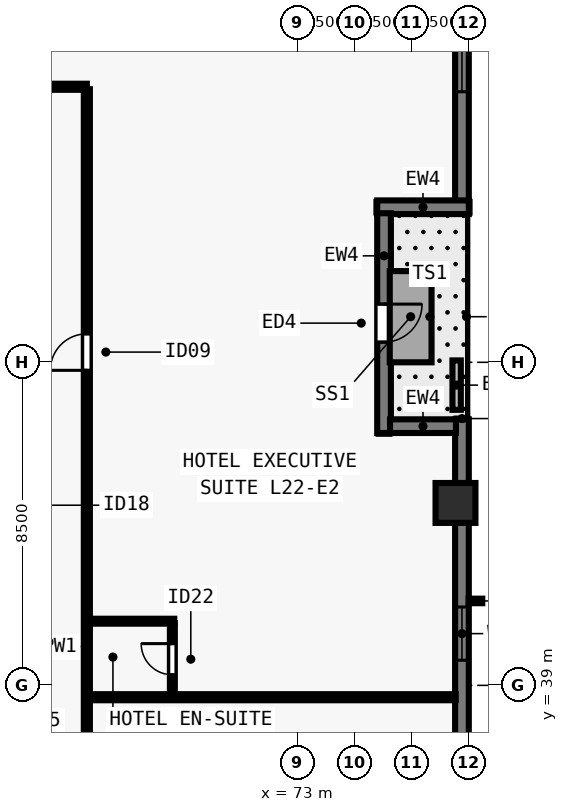
"""IFC4 building model, lengths in metres.
Left out: names, types, materials, properties, quantities, classifications, styles, units other than length and angle.
Written with IfcOpenShell. Run it as: python <this file> out.ifc"""

import sys

from ifc_helpers import new_model, si_unit, direction, frame, frame_2d, origin, origin_2d, place, context, subcontext, project, spatial, rectangle, extrude, element, fill, save


model = new_model("IFC4")
c1 = context("Model", 3, precision=1e-05, world=origin(), true_north=direction((0.0, 1.0)))
c2 = subcontext(c1, "Body", "Model", "MODEL_VIEW")
j1 = project(units=[si_unit("LENGTHUNIT", "METRE"), si_unit("PLANEANGLEUNIT", "RADIAN")], contexts=[c1])
p1 = place(None, origin())
s1 = spatial("IfcSite", under=j1, at=p1, CompositionType="ELEMENT")
p2 = place(p1, origin())
s2 = spatial("IfcBuilding", under=s1, at=p2, CompositionType="ELEMENT")
p3 = place(p2, frame((0.0, 0.0, 83.0)))
s3 = spatial("IfcBuildingStorey", under=s2, at=p3, CompositionType="ELEMENT", Elevation=83.0)
p4 = place(p3, frame((77.15, 43.8, 0.0), z_axis=(0.0, 0.0, 1.0), x_axis=(0.0, 1.0, 0.0)))
e1 = element("IfcColumn", 1, at=p4, inside=s3, PredefinedType="COLUMN", context=c2, shape_type="SweptSolid", body=[
    extrude(rectangle(XDim=1.05, YDim=1.05, at=origin_2d()), origin(), (0.0, 0.0, 1.0), 3.5),
])
p5 = place(p3, frame((77.32, 46.0, 0.0), z_axis=(0.0, 0.0, 1.0), x_axis=(0.0, -1.0, 0.0)))
e2 = element("IfcWall", 2, at=p5, inside=s3, PredefinedType="SOLIDWALL", context=c2, shape_type="SweptSolid", body=[
    extrude(rectangle(XDim=29.162, YDim=0.36, at=frame_2d((14.581, 0.0))), origin(), (0.0, 0.0, 1.0), 3.28),
])
p6 = place(p5, frame((4.938, 0.0, 0.8)))
e3 = element("IfcOpeningElement", 3, at=p6, cuts=e2, PredefinedType="OPENING", context=c2, shape_type="SweptSolid", body=[
    extrude(rectangle(XDim=1.4, YDim=1.544, at=frame_2d((0.7, 0.772))), frame((0.0, 0.19, 0.0), z_axis=(0.0, -1.0, 0.0), x_axis=(1.0, 0.0, 0.0)), (0.0, 0.0, 1.0), 0.38),
])
p7 = place(p5, frame((8.341, 0.0, 0.8)))
e4 = element("IfcOpeningElement", 4, at=p7, cuts=e2, PredefinedType="OPENING", context=c2, shape_type="SweptSolid", body=[
    extrude(rectangle(XDim=1.75, YDim=1.544, at=frame_2d((0.875, 0.772))), frame((0.0, 0.19, 0.0), z_axis=(0.0, -1.0, 0.0), x_axis=(1.0, 0.0, 0.0)), (0.0, 0.0, 1.0), 0.38),
])
p8 = place(p5, frame((12.942, 0.0, 0.8)))
e5 = element("IfcOpeningElement", 5, at=p8, cuts=e2, PredefinedType="OPENING", context=c2, shape_type="SweptSolid", body=[
    extrude(rectangle(XDim=1.4, YDim=1.544, at=frame_2d((0.7, 0.772))), frame((0.0, 0.19, 0.0), z_axis=(0.0, -1.0, 0.0), x_axis=(1.0, 0.0, 0.0)), (0.0, 0.0, 1.0), 0.38),
])
p9 = place(p5, frame((15.494, 0.0, 0.8)))
e6 = element("IfcOpeningElement", 6, at=p9, cuts=e2, PredefinedType="OPENING", context=c2, shape_type="SweptSolid", body=[
    extrude(rectangle(XDim=1.75, YDim=1.544, at=frame_2d((0.875, 0.772))), frame((0.0, 0.19, 0.0), z_axis=(0.0, -1.0, 0.0), x_axis=(1.0, 0.0, 0.0)), (0.0, 0.0, 1.0), 0.38),
])
p10 = place(p5, frame((19.247, 0.0, 0.8)))
e7 = element("IfcOpeningElement", 7, at=p10, cuts=e2, PredefinedType="OPENING", context=c2, shape_type="SweptSolid", body=[
    extrude(rectangle(XDim=1.4, YDim=1.544, at=frame_2d((0.7, 0.772))), frame((0.0, 0.19, 0.0), z_axis=(0.0, -1.0, 0.0), x_axis=(1.0, 0.0, 0.0)), (0.0, 0.0, 1.0), 0.38),
])
p11 = place(p3, frame((77.32, 61.5, 0.0), z_axis=(0.0, 0.0, 1.0), x_axis=(0.0, -1.0, 0.0)))
e8 = element("IfcWall", 8, at=p11, inside=s3, PredefinedType="SOLIDWALL", context=c2, shape_type="SweptSolid", body=[
    extrude(rectangle(XDim=9.762, YDim=0.36, at=frame_2d((4.881, 0.0))), origin(), (0.0, 0.0, 1.0), 3.28),
])
p12 = place(p11, frame((5.481, 0.0, 0.8)))
e9 = element("IfcOpeningElement", 9, at=p12, cuts=e8, PredefinedType="OPENING", context=c2, shape_type="SweptSolid", body=[
    extrude(rectangle(XDim=1.4, YDim=1.544, at=frame_2d((0.7, 0.772))), frame((0.0, 0.19, 0.0), z_axis=(0.0, -1.0, 0.0), x_axis=(1.0, 0.0, 0.0)), (0.0, 0.0, 1.0), 0.38),
])
p13 = place(p3, frame((77.5, 51.58, 0.0), z_axis=(0.0, 0.0, 1.0), x_axis=(-1.0, 0.0, 0.0)))
e10 = element("IfcWall", 10, at=p13, inside=s3, PredefinedType="SOLIDWALL", context=c2, shape_type="SweptSolid", body=[
    extrude(rectangle(XDim=2.41, YDim=0.36, at=frame_2d((1.205, 0.0))), origin(), (0.0, 0.0, 1.0), 3.28),
])
p14 = place(p3, frame((75.27, 51.422, 0.0), z_axis=(0.0, 0.0, 1.0), x_axis=(0.0, -1.0, 0.0)))
e11 = element("IfcWall", 11, at=p14, inside=s3, PredefinedType="SOLIDWALL", context=c2, shape_type="SweptSolid", body=[
    extrude(rectangle(XDim=5.782, YDim=0.36, at=frame_2d((2.891, 0.0))), origin(), (0.0, 0.0, 1.0), 3.28),
])
p15 = place(p14, frame((2.391, 0.0, 0.0)))
e12 = element("IfcOpeningElement", 12, at=p15, cuts=e11, PredefinedType="OPENING", context=c2, shape_type="SweptSolid", body=[
    extrude(rectangle(XDim=1.0, YDim=2.15, at=frame_2d((0.5, 1.075))), frame((0.0, 0.19, 0.0), z_axis=(0.0, -1.0, 0.0), x_axis=(1.0, 0.0, 0.0)), (0.0, 0.0, 1.0), 0.38),
])
p16 = place(p3, frame((75.428, 45.82, 0.0), z_axis=(0.0, 0.0, 1.0), x_axis=(1.0, 0.0, 0.0)))
e13 = element("IfcWall", 13, at=p16, inside=s3, PredefinedType="SOLIDWALL", context=c2, shape_type="SweptSolid", body=[
    extrude(rectangle(XDim=1.734, YDim=0.36, at=frame_2d((0.867, 0.0))), origin(), (0.0, 0.0, 1.0), 3.28),
])
p17 = place(p3, frame((77.18, 46.25, 0.0), z_axis=(0.0, 0.0, 1.0), x_axis=(0.0, 1.0, 0.0)))
e14 = element("IfcWall", 14, at=p17, inside=s3, PredefinedType="PARAPET", context=c2, shape_type="SweptSolid", body=[
    extrude(rectangle(XDim=1.3, YDim=0.22, at=frame_2d((0.65, 0.0))), origin(), (0.0, 0.0, 1.0), 0.55),
])
p18 = place(p3, frame((36.55, 54.75, 0.0), z_axis=(0.0, 0.0, 1.0), x_axis=(1.0, 0.0, 0.0)))
e15 = element("IfcWall", 15, at=p18, inside=s3, PredefinedType="PARTITIONING", context=c2, shape_type="SweptSolid", body=[
    extrude(rectangle(XDim=30.9, YDim=0.16, at=frame_2d((15.45, 0.0))), origin(), (0.0, 0.0, 1.0), 3.28),
])
p19 = place(p18, frame((2.83, 0.0, 0.0)))
e16 = element("IfcOpeningElement", 16, at=p19, cuts=e15, PredefinedType="OPENING", context=c2, shape_type="SweptSolid", body=[
    extrude(rectangle(XDim=0.96, YDim=2.15, at=frame_2d((0.48, 1.075))), frame((0.0, 0.09, 0.0), z_axis=(0.0, -1.0, 0.0), x_axis=(1.0, 0.0, 0.0)), (0.0, 0.0, 1.0), 0.18),
])
p20 = place(p18, frame((15.965, 0.0, 0.0)))
e17 = element("IfcOpeningElement", 17, at=p20, cuts=e15, PredefinedType="OPENING", context=c2, shape_type="SweptSolid", body=[
    extrude(rectangle(XDim=0.96, YDim=2.15, at=frame_2d((0.48, 1.075))), frame((0.0, 0.09, 0.0), z_axis=(0.0, -1.0, 0.0), x_axis=(1.0, 0.0, 0.0)), (0.0, 0.0, 1.0), 0.18),
])
p21 = place(p18, frame((28.105, 0.0, 0.0)))
e18 = element("IfcOpeningElement", 18, at=p21, cuts=e15, PredefinedType="OPENING", context=c2, shape_type="SweptSolid", body=[
    extrude(rectangle(XDim=0.96, YDim=2.15, at=frame_2d((0.48, 1.075))), frame((0.0, 0.09, 0.0), z_axis=(0.0, -1.0, 0.0), x_axis=(1.0, 0.0, 0.0)), (0.0, 0.0, 1.0), 0.18),
])
p22 = place(p3, frame((67.45, 23.315, 0.0), z_axis=(0.0, 0.0, 1.0), x_axis=(0.0, 1.0, 0.0)))
e19 = element("IfcWall", 19, at=p22, inside=s3, PredefinedType="PARTITIONING", context=c2, shape_type="SweptSolid", body=[
    extrude(rectangle(XDim=31.37, YDim=0.16, at=frame_2d((15.685, 0.0))), origin(), (0.0, 0.0, 1.0), 3.28),
])
p23 = place(p22, frame((8.474, 0.0, 0.0)))
e20 = element("IfcOpeningElement", 20, at=p23, cuts=e19, PredefinedType="OPENING", context=c2, shape_type="SweptSolid", body=[
    extrude(rectangle(XDim=0.96, YDim=2.15, at=frame_2d((0.48, 1.075))), frame((0.0, 0.09, 0.0), z_axis=(0.0, -1.0, 0.0), x_axis=(1.0, 0.0, 0.0)), (0.0, 0.0, 1.0), 0.18),
])
p24 = place(p22, frame((23.974, 0.0, 0.0)))
e21 = element("IfcOpeningElement", 21, at=p24, cuts=e19, PredefinedType="OPENING", context=c2, shape_type="SweptSolid", body=[
    extrude(rectangle(XDim=0.96, YDim=2.15, at=frame_2d((0.48, 1.075))), frame((0.0, 0.09, 0.0), z_axis=(0.0, -1.0, 0.0), x_axis=(1.0, 0.0, 0.0)), (0.0, 0.0, 1.0), 0.18),
])
p25 = place(p3, frame((67.515, 38.688, 0.0), z_axis=(0.0, 0.0, 1.0), x_axis=(1.0, 0.0, 0.0)))
e22 = element("IfcWall", 22, at=p25, inside=s3, PredefinedType="PARTITIONING", context=c2, shape_type="SweptSolid", body=[
    extrude(rectangle(XDim=9.64, YDim=0.16, at=frame_2d((4.82, 0.0))), origin(), (0.0, 0.0, 1.0), 3.28),
])
p26 = place(p3, frame((67.515, 40.688, 0.0), z_axis=(0.0, 0.0, 1.0), x_axis=(1.0, 0.0, 0.0)))
e23 = element("IfcWall", 23, at=p26, inside=s3, PredefinedType="PLUMBINGWALL", context=c2, shape_type="SweptSolid", body=[
    extrude(rectangle(XDim=2.235, YDim=0.13, at=frame_2d((1.118, 0.0))), origin(), (0.0, 0.0, 1.0), 3.28),
])
p27 = place(p3, frame((69.7, 38.753, 0.0), z_axis=(0.0, 0.0, 1.0), x_axis=(0.0, 1.0, 0.0)))
e24 = element("IfcWall", 24, at=p27, inside=s3, PredefinedType="PLUMBINGWALL", context=c2, shape_type="SweptSolid", body=[
    extrude(rectangle(XDim=1.885, YDim=0.13, at=frame_2d((0.942, 0.0))), origin(), (0.0, 0.0, 1.0), 3.28),
])
p28 = place(p27, frame((0.525, 0.0, 0.0)))
e25 = element("IfcOpeningElement", 25, at=p28, cuts=e24, PredefinedType="OPENING", context=c2, shape_type="SweptSolid", body=[
    extrude(rectangle(XDim=0.82, YDim=2.1, at=frame_2d((0.41, 1.05))), frame((0.0, 0.075, 0.0), z_axis=(0.0, -1.0, 0.0), x_axis=(1.0, 0.0, 0.0)), (0.0, 0.0, 1.0), 0.15),
])
p29 = place(p6, origin())
e26 = element("IfcWindow", 26, at=p29, inside=s3, PartitioningType="SINGLE_PANEL", PredefinedType="WINDOW", context=c2, shape_type="SweptSolid", body=[
    extrude(rectangle(XDim=1.4, YDim=1.544, at=frame_2d((0.7, 0.772))), frame((0.0, -0.05, 0.0), z_axis=(0.0, -1.0, 0.0), x_axis=(1.0, 0.0, 0.0)), (0.0, 0.0, 1.0), 0.06),
])
fill(e3, e26)
p30 = place(p12, origin())
e27 = element("IfcWindow", 27, at=p30, inside=s3, PartitioningType="SINGLE_PANEL", PredefinedType="WINDOW", context=c2, shape_type="SweptSolid", body=[
    extrude(rectangle(XDim=1.4, YDim=1.544, at=frame_2d((0.7, 0.772))), frame((0.0, -0.05, 0.0), z_axis=(0.0, -1.0, 0.0), x_axis=(1.0, 0.0, 0.0)), (0.0, 0.0, 1.0), 0.06),
])
fill(e9, e27)
p31 = place(p15, origin())
e28 = element("IfcDoor", 28, at=p31, inside=s3, OperationType="SINGLE_SWING_LEFT", PredefinedType="DOOR", context=c2, shape_type="SweptSolid", body=[
    extrude(rectangle(XDim=1.0, YDim=2.15, at=frame_2d((0.5, 1.075))), frame((0.0, 0.025, 0.0), z_axis=(0.0, -1.0, 0.0), x_axis=(1.0, 0.0, 0.0)), (0.0, 0.0, 1.0), 0.05),
])
fill(e12, e28)
p32 = place(p28, origin())
e29 = element("IfcDoor", 29, at=p32, inside=s3, OperationType="SINGLE_SWING_RIGHT", PredefinedType="DOOR", context=c2, shape_type="SweptSolid", body=[
    extrude(rectangle(XDim=0.82, YDim=2.1, at=frame_2d((0.41, 1.05))), frame((0.0, 0.025, 0.0), z_axis=(0.0, -1.0, 0.0), x_axis=(1.0, 0.0, 0.0)), (0.0, 0.0, 1.0), 0.05),
])
fill(e25, e29)
p33 = place(p24, origin())
e30 = element("IfcDoor", 30, at=p33, inside=s3, OperationType="SINGLE_SWING_LEFT", PredefinedType="DOOR", context=c2, shape_type="SweptSolid", body=[
    extrude(rectangle(XDim=0.96, YDim=2.15, at=frame_2d((0.48, 1.075))), frame((0.0, 0.025, 0.0), z_axis=(0.0, -1.0, 0.0), x_axis=(1.0, 0.0, 0.0)), (0.0, 0.0, 1.0), 0.05),
])
fill(e21, e30)
save(model, sys.argv[1])
